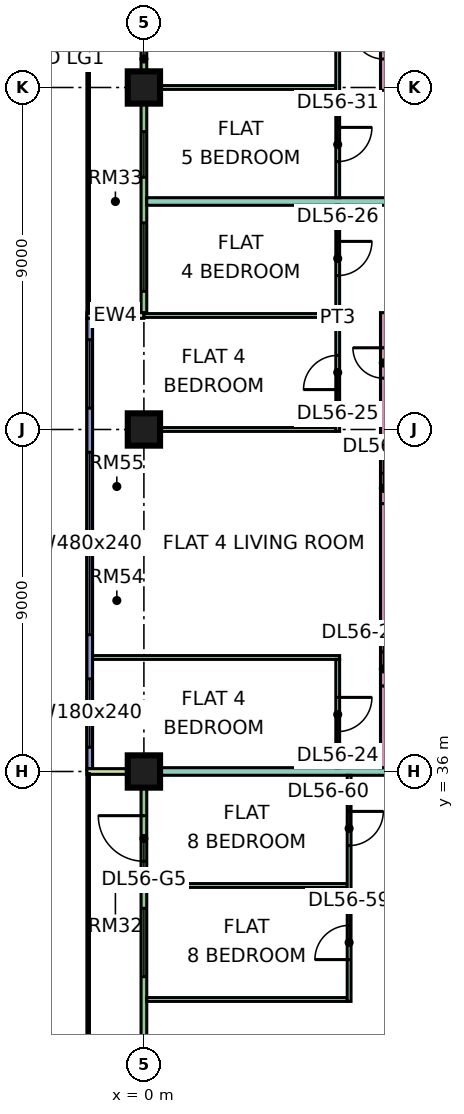
"""IFC4 building model, lengths in metres.
Left out: names, types, materials, properties, quantities, classifications, styles, units other than length and angle.
Written with IfcOpenShell. Run it as: python <this file> out.ifc"""

import sys

from ifc_helpers import new_model, si_unit, direction, frame, frame_2d, origin, origin_2d, place, context, subcontext, project, spatial, rectangle, extrude, element, fill, save


model = new_model("IFC4")
c1 = context("Model", 3, precision=1e-05, world=origin(), true_north=direction((0.0, 1.0)))
c2 = subcontext(c1, "Body", "Model", "MODEL_VIEW")
j1 = project(units=[si_unit("LENGTHUNIT", "METRE"), si_unit("PLANEANGLEUNIT", "RADIAN")], contexts=[c1])
p1 = place(None, origin())
s1 = spatial("IfcSite", under=j1, at=p1, CompositionType="ELEMENT")
p2 = place(p1, origin())
s2 = spatial("IfcBuilding", under=s1, at=p2, CompositionType="ELEMENT")
p3 = place(p2, frame((0.0, 0.0, 237.9)))
s3 = spatial("IfcBuildingStorey", under=s2, at=p3, CompositionType="ELEMENT", Elevation=237.9)
p4 = place(p3, frame((0.0, 36.0, 0.0), z_axis=(0.0, 0.0, 1.0), x_axis=(1.0, 0.0, 0.0)))
e1 = element("IfcColumn", 1, at=p4, inside=s3, PredefinedType="COLUMN", context=c2, shape_type="SweptSolid", body=[
    extrude(rectangle(XDim=0.85, YDim=0.85, at=origin_2d()), origin(), (0.0, 0.0, 1.0), 3.75),
])
p5 = place(p3, frame((0.0, 45.0, 0.0), z_axis=(0.0, 0.0, 1.0), x_axis=(1.0, 0.0, 0.0)))
e2 = element("IfcColumn", 2, at=p5, inside=s3, PredefinedType="COLUMN", context=c2, shape_type="SweptSolid", body=[
    extrude(rectangle(XDim=0.85, YDim=0.85, at=origin_2d()), origin(), (0.0, 0.0, 1.0), 3.75),
])
p6 = place(p3, frame((0.0, 54.0, 0.0), z_axis=(0.0, 0.0, 1.0), x_axis=(1.0, 0.0, 0.0)))
e3 = element("IfcColumn", 3, at=p6, inside=s3, PredefinedType="COLUMN", context=c2, shape_type="SweptSolid", body=[
    extrude(rectangle(XDim=0.85, YDim=0.85, at=origin_2d()), origin(), (0.0, 0.0, 1.0), 3.75),
])
p7 = place(p3, frame((0.0, 61.425, 0.0), z_axis=(0.0, 0.0, 1.0), x_axis=(0.0, -1.0, 0.0)))
e4 = element("IfcWall", 4, at=p7, inside=s3, PredefinedType="SOLIDWALL", context=c2, shape_type="SweptSolid", body=[
    extrude(rectangle(XDim=13.35, YDim=0.15, at=frame_2d((6.675, 0.0))), origin(), (0.0, 0.0, 1.0), 3.35),
])
p8 = place(p7, frame((1.312, 0.0, 0.0)))
e5 = element("IfcOpeningElement", 5, at=p8, cuts=e4, PredefinedType="OPENING", context=c2, shape_type="SweptSolid", body=[
    extrude(rectangle(XDim=1.8, YDim=2.4, at=frame_2d((0.9, 1.2))), frame((0.0, 0.085, 0.0), z_axis=(0.0, -1.0, 0.0), x_axis=(1.0, 0.0, 0.0)), (0.0, 0.0, 1.0), 0.17),
])
p9 = place(p7, frame((5.062, 0.0, 0.45)))
e6 = element("IfcOpeningElement", 6, at=p9, cuts=e4, PredefinedType="OPENING", context=c2, shape_type="SweptSolid", body=[
    extrude(rectangle(XDim=1.2, YDim=2.4, at=frame_2d((0.6, 1.2))), frame((0.0, 0.085, 0.0), z_axis=(0.0, -1.0, 0.0), x_axis=(1.0, 0.0, 0.0)), (0.0, 0.0, 1.0), 0.17),
])
p10 = place(p7, frame((8.587, 0.0, 0.45)))
e7 = element("IfcOpeningElement", 7, at=p10, cuts=e4, PredefinedType="OPENING", context=c2, shape_type="SweptSolid", body=[
    extrude(rectangle(XDim=1.2, YDim=2.4, at=frame_2d((0.6, 1.2))), frame((0.0, 0.085, 0.0), z_axis=(0.0, -1.0, 0.0), x_axis=(1.0, 0.0, 0.0)), (0.0, 0.0, 1.0), 0.17),
])
p11 = place(p7, frame((10.988, 0.0, 0.45)))
e8 = element("IfcOpeningElement", 8, at=p11, cuts=e4, PredefinedType="OPENING", context=c2, shape_type="SweptSolid", body=[
    extrude(rectangle(XDim=1.8, YDim=2.4, at=frame_2d((0.9, 1.2))), frame((0.0, 0.085, 0.0), z_axis=(0.0, -1.0, 0.0), x_axis=(1.0, 0.0, 0.0)), (0.0, 0.0, 1.0), 0.17),
])
p12 = place(p3, frame((-1.5, 48.0, 0.0), z_axis=(0.0, 0.0, 1.0), x_axis=(1.0, 0.0, 0.0)))
e9 = element("IfcWall", 9, at=p12, inside=s3, PredefinedType="SOLIDWALL", context=c2, shape_type="SweptSolid", body=[
    extrude(rectangle(XDim=1.5, YDim=0.15, at=frame_2d((0.75, 0.0))), origin(), (0.0, 0.0, 1.0), 3.35),
])
p13 = place(p3, frame((-1.425, 47.925, 0.0), z_axis=(0.0, 0.0, 1.0), x_axis=(0.0, -1.0, 0.0)))
e10 = element("IfcWall", 10, at=p13, inside=s3, PredefinedType="SOLIDWALL", context=c2, shape_type="SweptSolid", body=[
    extrude(rectangle(XDim=11.85, YDim=0.15, at=frame_2d((5.925, 0.0))), origin(), (0.0, 0.0, 1.0), 3.35),
])
p14 = place(p13, frame((0.562, 0.0, 0.45)))
e11 = element("IfcOpeningElement", 11, at=p14, cuts=e10, PredefinedType="OPENING", context=c2, shape_type="SweptSolid", body=[
    extrude(rectangle(XDim=1.8, YDim=2.4, at=frame_2d((0.9, 1.2))), frame((0.0, 0.085, 0.0), z_axis=(0.0, -1.0, 0.0), x_axis=(1.0, 0.0, 0.0)), (0.0, 0.0, 1.0), 0.17),
])
p15 = place(p13, frame((3.525, 0.0, 0.45)))
e12 = element("IfcOpeningElement", 12, at=p15, cuts=e10, PredefinedType="OPENING", context=c2, shape_type="SweptSolid", body=[
    extrude(rectangle(XDim=4.8, YDim=2.4, at=frame_2d((2.4, 1.2))), frame((0.0, 0.085, 0.0), z_axis=(0.0, -1.0, 0.0), x_axis=(1.0, 0.0, 0.0)), (0.0, 0.0, 1.0), 0.17),
])
p16 = place(p13, frame((9.488, 0.0, 0.45)))
e13 = element("IfcOpeningElement", 13, at=p16, cuts=e10, PredefinedType="OPENING", context=c2, shape_type="SweptSolid", body=[
    extrude(rectangle(XDim=1.8, YDim=2.4, at=frame_2d((0.9, 1.2))), frame((0.0, 0.085, 0.0), z_axis=(0.0, -1.0, 0.0), x_axis=(1.0, 0.0, 0.0)), (0.0, 0.0, 1.0), 0.17),
])
p17 = place(p3, frame((0.0, 35.925, 0.0), z_axis=(0.0, 0.0, 1.0), x_axis=(0.0, -1.0, 0.0)))
e14 = element("IfcWall", 14, at=p17, inside=s3, PredefinedType="SOLIDWALL", context=c2, shape_type="SweptSolid", body=[
    extrude(rectangle(XDim=11.85, YDim=0.15, at=frame_2d((5.925, 0.0))), origin(), (0.0, 0.0, 1.0), 3.35),
])
p18 = place(p17, frame((1.087, 0.0, 0.0)))
e15 = element("IfcOpeningElement", 15, at=p18, cuts=e14, PredefinedType="OPENING", context=c2, shape_type="SweptSolid", body=[
    extrude(rectangle(XDim=1.2, YDim=2.4, at=frame_2d((0.6, 1.2))), frame((0.0, 0.085, 0.0), z_axis=(0.0, -1.0, 0.0), x_axis=(1.0, 0.0, 0.0)), (0.0, 0.0, 1.0), 0.17),
])
p19 = place(p17, frame((3.525, 0.0, 0.45)))
e16 = element("IfcOpeningElement", 16, at=p19, cuts=e14, PredefinedType="OPENING", context=c2, shape_type="SweptSolid", body=[
    extrude(rectangle(XDim=1.8, YDim=2.4, at=frame_2d((0.9, 1.2))), frame((0.0, 0.085, 0.0), z_axis=(0.0, -1.0, 0.0), x_axis=(1.0, 0.0, 0.0)), (0.0, 0.0, 1.0), 0.17),
])
p20 = place(p17, frame((7.163, 0.0, 0.45)))
e17 = element("IfcOpeningElement", 17, at=p20, cuts=e14, PredefinedType="OPENING", context=c2, shape_type="SweptSolid", body=[
    extrude(rectangle(XDim=3.0, YDim=2.4, at=frame_2d((1.5, 1.2))), frame((0.0, 0.085, 0.0), z_axis=(0.0, -1.0, 0.0), x_axis=(1.0, 0.0, 0.0)), (0.0, 0.0, 1.0), 0.17),
])
p21 = place(p3, frame((-1.5, 36.0, 0.0), z_axis=(0.0, 0.0, 1.0), x_axis=(1.0, 0.0, 0.0)))
e18 = element("IfcWall", 18, at=p21, inside=s3, PredefinedType="SOLIDWALL", context=c2, shape_type="SweptSolid", body=[
    extrude(rectangle(XDim=1.5, YDim=0.15, at=frame_2d((0.75, 0.0))), origin(), (0.0, 0.0, 1.0), 3.35),
])
e19 = element("IfcWall", 19, at=p4, inside=s3, PredefinedType="PARTITIONING", context=c2, shape_type="SweptSolid", body=[
    extrude(rectangle(XDim=6.375, YDim=0.2, at=frame_2d((3.188, 0.0))), origin(), (0.0, 0.0, 1.0), 3.35),
])
p22 = place(p3, frame((-1.35, 39.0, 0.0), z_axis=(0.0, 0.0, 1.0), x_axis=(1.0, 0.0, 0.0)))
e20 = element("IfcWall", 20, at=p22, inside=s3, PredefinedType="PARTITIONING", context=c2, shape_type="SweptSolid", body=[
    extrude(rectangle(XDim=6.5, YDim=0.1, at=frame_2d((3.25, 0.0))), origin(), (0.0, 0.0, 1.0), 3.35),
])
e21 = element("IfcWall", 21, at=p5, inside=s3, PredefinedType="PARTITIONING", context=c2, shape_type="SweptSolid", body=[
    extrude(rectangle(XDim=5.05, YDim=0.1, at=frame_2d((2.525, 0.0))), origin(), (0.0, 0.0, 1.0), 3.35),
])
p23 = place(p3, frame((0.0, 48.0, 0.0), z_axis=(0.0, 0.0, 1.0), x_axis=(1.0, 0.0, 0.0)))
e22 = element("IfcWall", 22, at=p23, inside=s3, PredefinedType="PARTITIONING", context=c2, shape_type="SweptSolid", body=[
    extrude(rectangle(XDim=5.05, YDim=0.1, at=frame_2d((2.525, 0.0))), origin(), (0.0, 0.0, 1.0), 3.35),
])
for number, where, z_axis, x_axis in (
    (23, (0.074, 30.0, 0.0), (0.0, 0.0, 1.0), (1.0, 0.0, 0.0)),
    (24, (0.074, 33.0, 0.0), (0.0, 0.0, 1.0), (1.0, 0.0, 0.0)),
):
    element("IfcWall", number, at=place(p3, frame(where, z_axis=z_axis, x_axis=x_axis)), inside=s3, PredefinedType="PARTITIONING", context=c2, shape_type="SweptSolid", body=[
        extrude(rectangle(XDim=5.276, YDim=0.1, at=frame_2d((2.638, 0.0))), origin(), (0.0, 0.0, 1.0), 3.35),
    ])
p24 = place(p3, frame((0.074, 51.0, 0.0), z_axis=(0.0, 0.0, 1.0), x_axis=(1.0, 0.0, 0.0)))
e25 = element("IfcWall", 25, at=p24, inside=s3, PredefinedType="PARTITIONING", context=c2, shape_type="SweptSolid", body=[
    extrude(rectangle(XDim=9.426, YDim=0.2, at=frame_2d((4.713, 0.0))), origin(), (0.0, 0.0, 1.0), 3.35),
])
p25 = place(p3, frame((0.074, 54.0, 0.0), z_axis=(0.0, 0.0, 1.0), x_axis=(1.0, 0.0, 0.0)))
e26 = element("IfcWall", 26, at=p25, inside=s3, PredefinedType="PARTITIONING", context=c2, shape_type="SweptSolid", body=[
    extrude(rectangle(XDim=4.976, YDim=0.1, at=frame_2d((2.488, 0.0))), origin(), (0.0, 0.0, 1.0), 3.35),
])
p26 = place(p3, frame((5.1, 36.1, 0.0), z_axis=(0.0, 0.0, 1.0), x_axis=(0.0, 1.0, 0.0)))
e27 = element("IfcWall", 27, at=p26, inside=s3, PredefinedType="PARTITIONING", context=c2, shape_type="SweptSolid", body=[
    extrude(rectangle(XDim=2.85, YDim=0.1, at=frame_2d((1.425, 0.0))), origin(), (0.0, 0.0, 1.0), 3.35),
])
p27 = place(p26, frame((0.95, 0.0, 0.0)))
e28 = element("IfcOpeningElement", 28, at=p27, cuts=e27, PredefinedType="OPENING", context=c2, shape_type="SweptSolid", body=[
    extrude(rectangle(XDim=0.9, YDim=2.1, at=frame_2d((0.45, 1.05))), frame((0.0, 0.06, 0.0), z_axis=(0.0, -1.0, 0.0), x_axis=(1.0, 0.0, 0.0)), (0.0, 0.0, 1.0), 0.12),
])
p28 = place(p3, frame((5.1, 44.95, 0.0), z_axis=(0.0, 0.0, 1.0), x_axis=(0.0, 1.0, 0.0)))
e29 = element("IfcWall", 29, at=p28, inside=s3, PredefinedType="PARTITIONING", context=c2, shape_type="SweptSolid", body=[
    extrude(rectangle(XDim=5.95, YDim=0.1, at=frame_2d((2.975, 0.0))), origin(), (0.0, 0.0, 1.0), 3.35),
])
p29 = place(p28, frame((1.1, 0.0, 0.0)))
e30 = element("IfcOpeningElement", 30, at=p29, cuts=e29, PredefinedType="OPENING", context=c2, shape_type="SweptSolid", body=[
    extrude(rectangle(XDim=0.9, YDim=2.1, at=frame_2d((0.45, 1.05))), frame((0.0, 0.06, 0.0), z_axis=(0.0, -1.0, 0.0), x_axis=(1.0, 0.0, 0.0)), (0.0, 0.0, 1.0), 0.12),
])
p30 = place(p28, frame((4.1, 0.0, 0.0)))
e31 = element("IfcOpeningElement", 31, at=p30, cuts=e29, PredefinedType="OPENING", context=c2, shape_type="SweptSolid", body=[
    extrude(rectangle(XDim=0.9, YDim=2.1, at=frame_2d((0.45, 1.05))), frame((0.0, 0.06, 0.0), z_axis=(0.0, -1.0, 0.0), x_axis=(1.0, 0.0, 0.0)), (0.0, 0.0, 1.0), 0.12),
])
p31 = place(p3, frame((5.1, 51.1, 0.0), z_axis=(0.0, 0.0, 1.0), x_axis=(0.0, 1.0, 0.0)))
e32 = element("IfcWall", 32, at=p31, inside=s3, PredefinedType="PARTITIONING", context=c2, shape_type="SweptSolid", body=[
    extrude(rectangle(XDim=5.95, YDim=0.1, at=frame_2d((2.975, 0.0))), origin(), (0.0, 0.0, 1.0), 3.35),
])
p32 = place(p31, frame((0.95, 0.0, 0.0)))
e33 = element("IfcOpeningElement", 33, at=p32, cuts=e32, PredefinedType="OPENING", context=c2, shape_type="SweptSolid", body=[
    extrude(rectangle(XDim=0.9, YDim=2.1, at=frame_2d((0.45, 1.05))), frame((0.0, 0.06, 0.0), z_axis=(0.0, -1.0, 0.0), x_axis=(1.0, 0.0, 0.0)), (0.0, 0.0, 1.0), 0.12),
])
p33 = place(p31, frame((3.95, 0.0, 0.0)))
e34 = element("IfcOpeningElement", 34, at=p33, cuts=e32, PredefinedType="OPENING", context=c2, shape_type="SweptSolid", body=[
    extrude(rectangle(XDim=0.9, YDim=2.1, at=frame_2d((0.45, 1.05))), frame((0.0, 0.06, 0.0), z_axis=(0.0, -1.0, 0.0), x_axis=(1.0, 0.0, 0.0)), (0.0, 0.0, 1.0), 0.12),
])
p34 = place(p3, frame((5.4, 29.95, 0.0), z_axis=(0.0, 0.0, 1.0), x_axis=(0.0, 1.0, 0.0)))
e35 = element("IfcWall", 35, at=p34, inside=s3, PredefinedType="PARTITIONING", context=c2, shape_type="SweptSolid", body=[
    extrude(rectangle(XDim=5.95, YDim=0.1, at=frame_2d((2.975, 0.0))), origin(), (0.0, 0.0, 1.0), 3.35),
])
p35 = place(p34, frame((1.1, 0.0, 0.0)))
e36 = element("IfcOpeningElement", 36, at=p35, cuts=e35, PredefinedType="OPENING", context=c2, shape_type="SweptSolid", body=[
    extrude(rectangle(XDim=0.9, YDim=2.1, at=frame_2d((0.45, 1.05))), frame((0.0, 0.06, 0.0), z_axis=(0.0, -1.0, 0.0), x_axis=(1.0, 0.0, 0.0)), (0.0, 0.0, 1.0), 0.12),
])
p36 = place(p34, frame((4.1, 0.0, 0.0)))
e37 = element("IfcOpeningElement", 37, at=p36, cuts=e35, PredefinedType="OPENING", context=c2, shape_type="SweptSolid", body=[
    extrude(rectangle(XDim=0.9, YDim=2.1, at=frame_2d((0.45, 1.05))), frame((0.0, 0.06, 0.0), z_axis=(0.0, -1.0, 0.0), x_axis=(1.0, 0.0, 0.0)), (0.0, 0.0, 1.0), 0.12),
])
p37 = place(p3, frame((6.3, 36.1, 0.0), z_axis=(0.0, 0.0, 1.0), x_axis=(0.0, 1.0, 0.0)))
e38 = element("IfcWall", 38, at=p37, inside=s3, PredefinedType="PARTITIONING", context=c2, shape_type="SweptSolid", body=[
    extrude(rectangle(XDim=11.975, YDim=0.15, at=frame_2d((5.987, 0.0))), origin(), (0.0, 0.0, 1.0), 3.35),
])
p38 = place(p37, frame((6.95, 0.0, 0.0)))
e39 = element("IfcOpeningElement", 39, at=p38, cuts=e38, PredefinedType="OPENING", context=c2, shape_type="SweptSolid", body=[
    extrude(rectangle(XDim=0.8, YDim=2.1, at=frame_2d((0.4, 1.05))), frame((0.0, 0.085, 0.0), z_axis=(0.0, -1.0, 0.0), x_axis=(1.0, 0.0, 0.0)), (0.0, 0.0, 1.0), 0.17),
])
p39 = place(p37, frame((2.15, 0.0, 0.0)))
e40 = element("IfcOpeningElement", 40, at=p39, cuts=e38, PredefinedType="OPENING", context=c2, shape_type="SweptSolid", body=[
    extrude(rectangle(XDim=0.9, YDim=2.1, at=frame_2d((0.45, 1.05))), frame((0.0, 0.085, 0.0), z_axis=(0.0, -1.0, 0.0), x_axis=(1.0, 0.0, 0.0)), (0.0, 0.0, 1.0), 0.17),
])
p40 = place(p37, frame((10.25, 0.0, 0.0)))
e41 = element("IfcOpeningElement", 41, at=p40, cuts=e38, PredefinedType="OPENING", context=c2, shape_type="SweptSolid", body=[
    extrude(rectangle(XDim=0.8, YDim=2.1, at=frame_2d((0.4, 1.05))), frame((0.0, 0.085, 0.0), z_axis=(0.0, -1.0, 0.0), x_axis=(1.0, 0.0, 0.0)), (0.0, 0.0, 1.0), 0.17),
])
p41 = place(p3, frame((6.3, 53.925, 0.0), z_axis=(0.0, 0.0, 1.0), x_axis=(0.0, 1.0, 0.0)))
e42 = element("IfcWall", 42, at=p41, inside=s3, PredefinedType="PARTITIONING", context=c2, shape_type="SweptSolid", body=[
    extrude(rectangle(XDim=9.001, YDim=0.15, at=frame_2d((4.5, 0.0))), origin(), (0.0, 0.0, 1.0), 3.35),
])
p42 = place(p41, frame((3.525, 0.0, 0.0)))
e43 = element("IfcOpeningElement", 43, at=p42, cuts=e42, PredefinedType="OPENING", context=c2, shape_type="SweptSolid", body=[
    extrude(rectangle(XDim=0.8, YDim=2.1, at=frame_2d((0.4, 1.05))), frame((0.0, 0.085, 0.0), z_axis=(0.0, -1.0, 0.0), x_axis=(1.0, 0.0, 0.0)), (0.0, 0.0, 1.0), 0.17),
])
p43 = place(p41, frame((6.825, 0.0, 0.0)))
e44 = element("IfcOpeningElement", 44, at=p43, cuts=e42, PredefinedType="OPENING", context=c2, shape_type="SweptSolid", body=[
    extrude(rectangle(XDim=0.9, YDim=2.1, at=frame_2d((0.45, 1.05))), frame((0.0, 0.085, 0.0), z_axis=(0.0, -1.0, 0.0), x_axis=(1.0, 0.0, 0.0)), (0.0, 0.0, 1.0), 0.17),
])
p44 = place(p41, frame((0.825, 0.0, 0.0)))
e45 = element("IfcOpeningElement", 45, at=p44, cuts=e42, PredefinedType="OPENING", context=c2, shape_type="SweptSolid", body=[
    extrude(rectangle(XDim=0.8, YDim=2.1, at=frame_2d((0.4, 1.05))), frame((0.0, 0.085, 0.0), z_axis=(0.0, -1.0, 0.0), x_axis=(1.0, 0.0, 0.0)), (0.0, 0.0, 1.0), 0.17),
])
p45 = place(p10, origin())
e46 = element("IfcWindow", 46, at=p45, inside=s3, PartitioningType="SINGLE_PANEL", PredefinedType="WINDOW", context=c2, shape_type="SweptSolid", body=[
    extrude(rectangle(XDim=1.2, YDim=2.4, at=frame_2d((0.6, 1.2))), frame((0.0, 0.03, 0.0), z_axis=(0.0, -1.0, 0.0), x_axis=(1.0, 0.0, 0.0)), (0.0, 0.0, 1.0), 0.06),
])
fill(e7, e46)
p46 = place(p11, origin())
e47 = element("IfcWindow", 47, at=p46, inside=s3, PartitioningType="SINGLE_PANEL", PredefinedType="WINDOW", context=c2, shape_type="SweptSolid", body=[
    extrude(rectangle(XDim=1.8, YDim=2.4, at=frame_2d((0.9, 1.2))), frame((0.0, 0.03, 0.0), z_axis=(0.0, -1.0, 0.0), x_axis=(1.0, 0.0, 0.0)), (0.0, 0.0, 1.0), 0.06),
])
fill(e8, e47)
p47 = place(p14, origin())
e48 = element("IfcWindow", 48, at=p47, inside=s3, PartitioningType="SINGLE_PANEL", PredefinedType="WINDOW", context=c2, shape_type="SweptSolid", body=[
    extrude(rectangle(XDim=1.8, YDim=2.4, at=frame_2d((0.9, 1.2))), frame((0.0, 0.03, 0.0), z_axis=(0.0, -1.0, 0.0), x_axis=(1.0, 0.0, 0.0)), (0.0, 0.0, 1.0), 0.06),
])
fill(e11, e48)
p48 = place(p15, origin())
e49 = element("IfcWindow", 49, at=p48, inside=s3, PartitioningType="SINGLE_PANEL", PredefinedType="WINDOW", context=c2, shape_type="SweptSolid", body=[
    extrude(rectangle(XDim=4.8, YDim=2.4, at=frame_2d((2.4, 1.2))), frame((0.0, 0.03, 0.0), z_axis=(0.0, -1.0, 0.0), x_axis=(1.0, 0.0, 0.0)), (0.0, 0.0, 1.0), 0.06),
])
fill(e12, e49)
p49 = place(p16, origin())
e50 = element("IfcWindow", 50, at=p49, inside=s3, PartitioningType="SINGLE_PANEL", PredefinedType="WINDOW", context=c2, shape_type="SweptSolid", body=[
    extrude(rectangle(XDim=1.8, YDim=2.4, at=frame_2d((0.9, 1.2))), frame((0.0, 0.03, 0.0), z_axis=(0.0, -1.0, 0.0), x_axis=(1.0, 0.0, 0.0)), (0.0, 0.0, 1.0), 0.06),
])
fill(e13, e50)
p50 = place(p18, frame((1.2, 0.0, 0.0), z_axis=(0.0, 0.0, 1.0), x_axis=(-1.0, 0.0, 0.0)))
e51 = element("IfcDoor", 51, at=p50, inside=s3, OperationType="DOUBLE_DOOR_SINGLE_SWING", PredefinedType="DOOR", context=c2, shape_type="SweptSolid", body=[
    extrude(rectangle(XDim=1.2, YDim=2.4, at=frame_2d((0.6, 1.2))), frame((0.0, 0.025, 0.0), z_axis=(0.0, -1.0, 0.0), x_axis=(1.0, 0.0, 0.0)), (0.0, 0.0, 1.0), 0.05),
])
fill(e15, e51)
p51 = place(p19, origin())
e52 = element("IfcWindow", 52, at=p51, inside=s3, PartitioningType="SINGLE_PANEL", PredefinedType="WINDOW", context=c2, shape_type="SweptSolid", body=[
    extrude(rectangle(XDim=1.8, YDim=2.4, at=frame_2d((0.9, 1.2))), frame((0.0, 0.03, 0.0), z_axis=(0.0, -1.0, 0.0), x_axis=(1.0, 0.0, 0.0)), (0.0, 0.0, 1.0), 0.06),
])
fill(e16, e52)
p52 = place(p38, frame((0.8, 0.0, 0.0), z_axis=(0.0, 0.0, 1.0), x_axis=(-1.0, 0.0, 0.0)))
e53 = element("IfcDoor", 53, at=p52, inside=s3, OperationType="SINGLE_SWING_LEFT", PredefinedType="DOOR", context=c2, shape_type="SweptSolid", body=[
    extrude(rectangle(XDim=0.8, YDim=2.1, at=frame_2d((0.4, 1.05))), frame((0.0, 0.025, 0.0), z_axis=(0.0, -1.0, 0.0), x_axis=(1.0, 0.0, 0.0)), (0.0, 0.0, 1.0), 0.05),
])
fill(e39, e53)
p53 = place(p27, origin())
e54 = element("IfcDoor", 54, at=p53, inside=s3, OperationType="SINGLE_SWING_RIGHT", PredefinedType="DOOR", context=c2, shape_type="SweptSolid", body=[
    extrude(rectangle(XDim=0.9, YDim=2.1, at=frame_2d((0.45, 1.05))), frame((0.0, 0.025, 0.0), z_axis=(0.0, -1.0, 0.0), x_axis=(1.0, 0.0, 0.0)), (0.0, 0.0, 1.0), 0.05),
])
fill(e28, e54)
p54 = place(p29, origin())
e55 = element("IfcDoor", 55, at=p54, inside=s3, OperationType="SINGLE_SWING_LEFT", PredefinedType="DOOR", context=c2, shape_type="SweptSolid", body=[
    extrude(rectangle(XDim=0.9, YDim=2.1, at=frame_2d((0.45, 1.05))), frame((0.0, 0.025, 0.0), z_axis=(0.0, -1.0, 0.0), x_axis=(1.0, 0.0, 0.0)), (0.0, 0.0, 1.0), 0.05),
])
fill(e30, e55)
p55 = place(p30, origin())
e56 = element("IfcDoor", 56, at=p55, inside=s3, OperationType="SINGLE_SWING_RIGHT", PredefinedType="DOOR", context=c2, shape_type="SweptSolid", body=[
    extrude(rectangle(XDim=0.9, YDim=2.1, at=frame_2d((0.45, 1.05))), frame((0.0, 0.025, 0.0), z_axis=(0.0, -1.0, 0.0), x_axis=(1.0, 0.0, 0.0)), (0.0, 0.0, 1.0), 0.05),
])
fill(e31, e56)
p56 = place(p39, frame((0.9, 0.0, 0.0), z_axis=(0.0, 0.0, 1.0), x_axis=(-1.0, 0.0, 0.0)))
e57 = element("IfcDoor", 57, at=p56, inside=s3, OperationType="SINGLE_SWING_LEFT", PredefinedType="DOOR", context=c2, shape_type="SweptSolid", body=[
    extrude(rectangle(XDim=0.9, YDim=2.1, at=frame_2d((0.45, 1.05))), frame((0.0, 0.025, 0.0), z_axis=(0.0, -1.0, 0.0), x_axis=(1.0, 0.0, 0.0)), (0.0, 0.0, 1.0), 0.05),
])
fill(e40, e57)
p57 = place(p40, frame((0.8, 0.0, 0.0), z_axis=(0.0, 0.0, 1.0), x_axis=(-1.0, 0.0, 0.0)))
e58 = element("IfcDoor", 58, at=p57, inside=s3, OperationType="SINGLE_SWING_RIGHT", PredefinedType="DOOR", context=c2, shape_type="SweptSolid", body=[
    extrude(rectangle(XDim=0.8, YDim=2.1, at=frame_2d((0.4, 1.05))), frame((0.0, 0.025, 0.0), z_axis=(0.0, -1.0, 0.0), x_axis=(1.0, 0.0, 0.0)), (0.0, 0.0, 1.0), 0.05),
])
fill(e41, e58)
p58 = place(p32, origin())
e59 = element("IfcDoor", 59, at=p58, inside=s3, OperationType="SINGLE_SWING_RIGHT", PredefinedType="DOOR", context=c2, shape_type="SweptSolid", body=[
    extrude(rectangle(XDim=0.9, YDim=2.1, at=frame_2d((0.45, 1.05))), frame((0.0, 0.025, 0.0), z_axis=(0.0, -1.0, 0.0), x_axis=(1.0, 0.0, 0.0)), (0.0, 0.0, 1.0), 0.05),
])
fill(e33, e59)
p59 = place(p44, frame((0.8, 0.0, 0.0), z_axis=(0.0, 0.0, 1.0), x_axis=(-1.0, 0.0, 0.0)))
e60 = element("IfcDoor", 60, at=p59, inside=s3, OperationType="SINGLE_SWING_RIGHT", PredefinedType="DOOR", context=c2, shape_type="SweptSolid", body=[
    extrude(rectangle(XDim=0.8, YDim=2.1, at=frame_2d((0.4, 1.05))), frame((0.0, 0.025, 0.0), z_axis=(0.0, -1.0, 0.0), x_axis=(1.0, 0.0, 0.0)), (0.0, 0.0, 1.0), 0.05),
])
fill(e45, e60)
p60 = place(p35, origin())
e61 = element("IfcDoor", 61, at=p60, inside=s3, OperationType="SINGLE_SWING_LEFT", PredefinedType="DOOR", context=c2, shape_type="SweptSolid", body=[
    extrude(rectangle(XDim=0.9, YDim=2.1, at=frame_2d((0.45, 1.05))), frame((0.0, 0.025, 0.0), z_axis=(0.0, -1.0, 0.0), x_axis=(1.0, 0.0, 0.0)), (0.0, 0.0, 1.0), 0.05),
])
fill(e36, e61)
p61 = place(p36, origin())
e62 = element("IfcDoor", 62, at=p61, inside=s3, OperationType="SINGLE_SWING_RIGHT", PredefinedType="DOOR", context=c2, shape_type="SweptSolid", body=[
    extrude(rectangle(XDim=0.9, YDim=2.1, at=frame_2d((0.45, 1.05))), frame((0.0, 0.025, 0.0), z_axis=(0.0, -1.0, 0.0), x_axis=(1.0, 0.0, 0.0)), (0.0, 0.0, 1.0), 0.05),
])
fill(e37, e62)
save(model, sys.argv[1])
